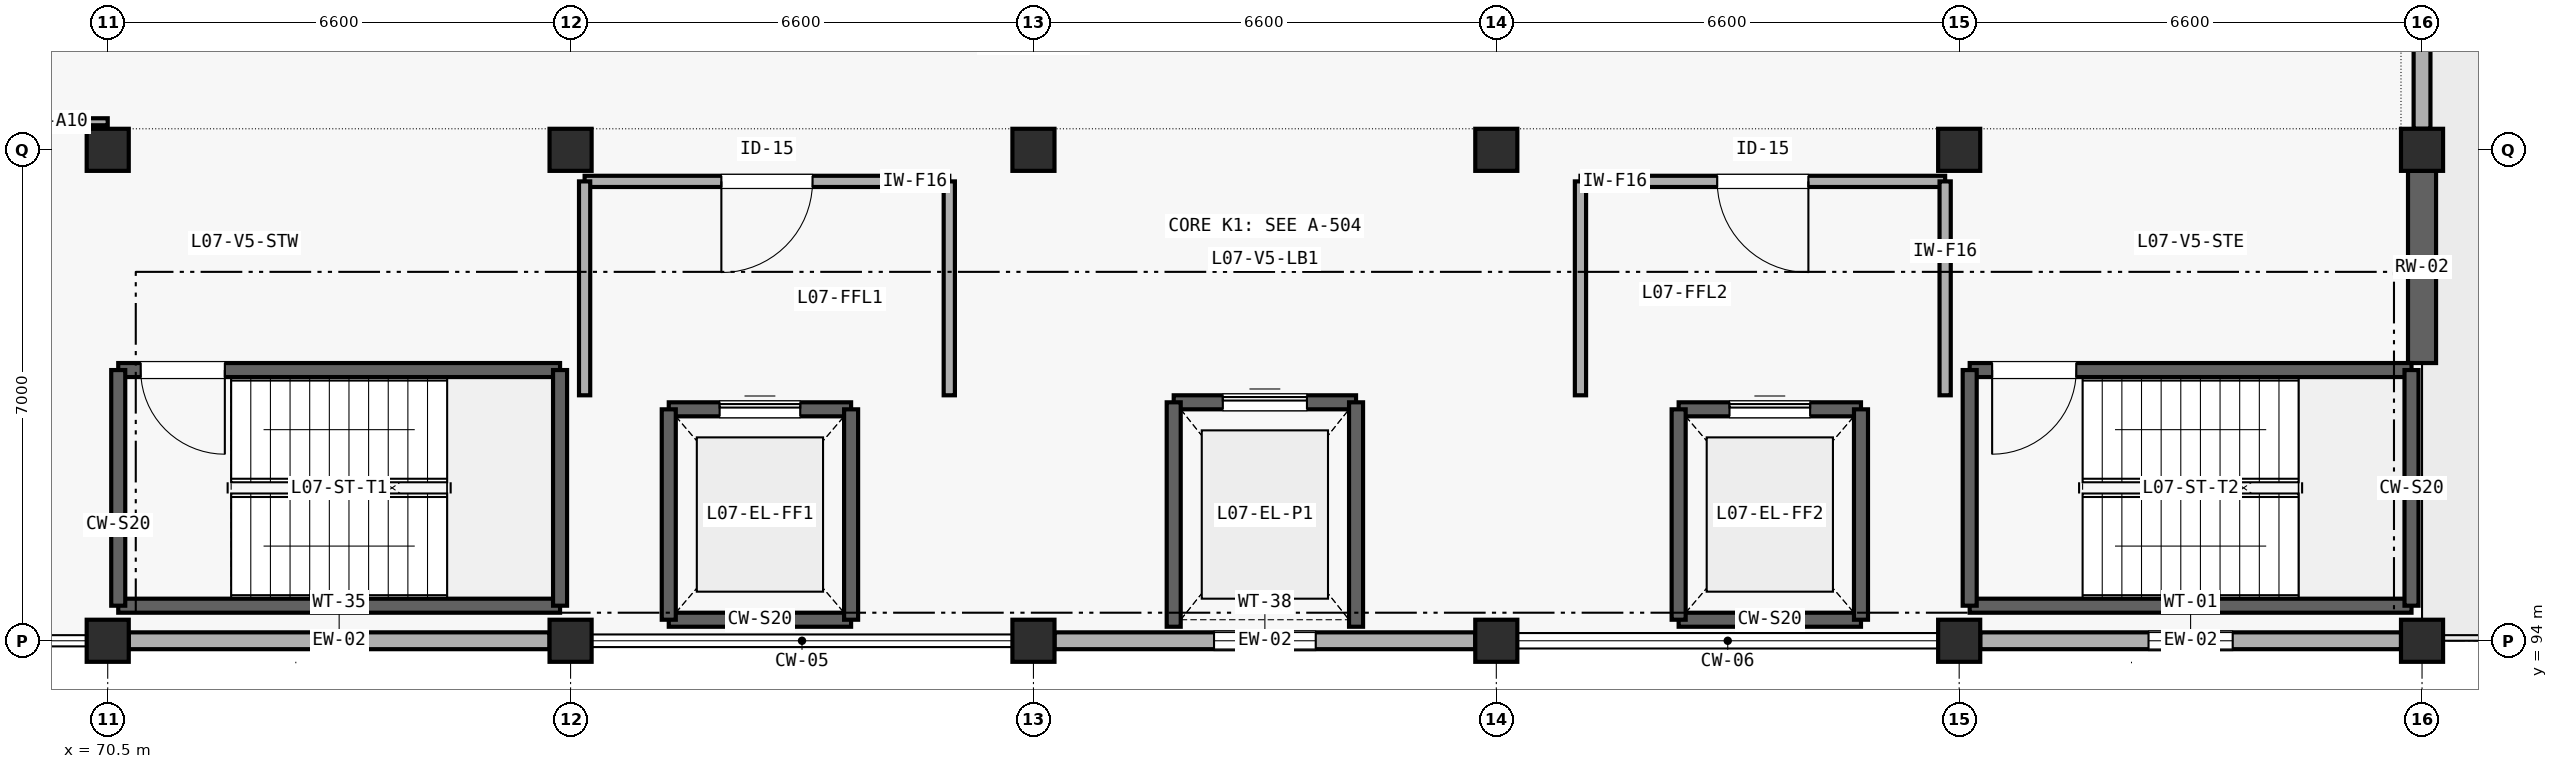
"""IFC4 building model, lengths in metres.
Left out: names, types, materials, properties, quantities, classifications, styles, units other than length and angle.
Written with IfcOpenShell. Run it as: python <this file> out.ifc"""

import sys

from ifc_helpers import new_model, si_unit, direction, frame, frame_2d, origin, origin_2d, place, context, subcontext, project, spatial, rectangle, extrude, element, fill, save


model = new_model("IFC4")
c1 = context("Model", 3, precision=1e-05, world=origin(), true_north=direction((0.0, 1.0)))
c2 = subcontext(c1, "Body", "Model", "MODEL_VIEW")
j1 = project(units=[si_unit("LENGTHUNIT", "METRE"), si_unit("PLANEANGLEUNIT", "RADIAN")], contexts=[c1])
p1 = place(None, origin())
s1 = spatial("IfcSite", under=j1, at=p1, CompositionType="ELEMENT")
p2 = place(p1, origin())
s2 = spatial("IfcBuilding", under=s1, at=p2, CompositionType="ELEMENT")
p3 = place(p2, frame((0.0, 0.0, 29.4)))
s3 = spatial("IfcBuildingStorey", under=s2, at=p3, CompositionType="ELEMENT", Elevation=29.4)
for number, where, z_axis, x_axis in (
    (1, (70.5, 94.0, 0.0), (0.0, 0.0, 1.0), (1.0, 0.0, 0.0)),
    (2, (70.5, 101.0, 0.0), (0.0, 0.0, 1.0), (1.0, 0.0, 0.0)),
    (3, (77.1, 94.0, 0.0), (0.0, 0.0, 1.0), (1.0, 0.0, 0.0)),
    (4, (77.1, 101.0, 0.0), (0.0, 0.0, 1.0), (1.0, 0.0, 0.0)),
    (5, (83.7, 94.0, 0.0), (0.0, 0.0, 1.0), (1.0, 0.0, 0.0)),
    (6, (83.7, 101.0, 0.0), (0.0, 0.0, 1.0), (1.0, 0.0, 0.0)),
    (7, (90.3, 94.0, 0.0), (0.0, 0.0, 1.0), (1.0, 0.0, 0.0)),
    (8, (90.3, 101.0, 0.0), (0.0, 0.0, 1.0), (1.0, 0.0, 0.0)),
    (9, (96.9, 94.0, 0.0), (0.0, 0.0, 1.0), (1.0, 0.0, 0.0)),
    (10, (96.9, 101.0, 0.0), (0.0, 0.0, 1.0), (1.0, 0.0, 0.0)),
    (11, (103.5, 94.0, 0.0), (0.0, 0.0, 1.0), (1.0, 0.0, 0.0)),
    (12, (103.5, 101.0, 0.0), (0.0, 0.0, 1.0), (1.0, 0.0, 0.0)),
):
    element("IfcColumn", number, at=place(p3, frame(where, z_axis=z_axis, x_axis=x_axis)), inside=s3, PredefinedType="COLUMN", context=c2, shape_type="SweptSolid", body=[
        extrude(rectangle(XDim=0.6, YDim=0.6, at=origin_2d()), origin(), (0.0, 0.0, 1.0), 4.2),
    ])
p4 = place(p3, frame((70.8, 94.0, 0.0), z_axis=(0.0, 0.0, 1.0), x_axis=(1.0, 0.0, 0.0)))
e13 = element("IfcWall", 13, at=p4, inside=s3, PredefinedType="SOLIDWALL", context=c2, shape_type="SweptSolid", body=[
    extrude(rectangle(XDim=6.0, YDim=0.24, at=frame_2d((3.0, 0.0))), origin(), (0.0, 0.0, 1.0), 3.135),
])
p5 = place(p4, frame((2.625, 0.0, 0.85)))
e14 = element("IfcOpeningElement", 14, at=p5, cuts=e13, PredefinedType="OPENING", context=c2, shape_type="SweptSolid", body=[
    extrude(rectangle(XDim=0.75, YDim=1.55, at=frame_2d((0.375, 0.775))), frame((0.0, 0.13, 0.0), z_axis=(0.0, -1.0, 0.0), x_axis=(1.0, 0.0, 0.0)), (0.0, 0.0, 1.0), 0.26),
])
p6 = place(p3, frame((84.0, 94.0, 0.0), z_axis=(0.0, 0.0, 1.0), x_axis=(1.0, 0.0, 0.0)))
e15 = element("IfcWall", 15, at=p6, inside=s3, PredefinedType="SOLIDWALL", context=c2, shape_type="SweptSolid", body=[
    extrude(rectangle(XDim=6.0, YDim=0.24, at=frame_2d((3.0, 0.0))), origin(), (0.0, 0.0, 1.0), 3.285),
])
p7 = place(p6, frame((2.275, 0.0, 0.85)))
e16 = element("IfcOpeningElement", 16, at=p7, cuts=e15, PredefinedType="OPENING", context=c2, shape_type="SweptSolid", body=[
    extrude(rectangle(XDim=1.45, YDim=1.55, at=frame_2d((0.725, 0.775))), frame((0.0, 0.13, 0.0), z_axis=(0.0, -1.0, 0.0), x_axis=(1.0, 0.0, 0.0)), (0.0, 0.0, 1.0), 0.26),
])
p8 = place(p3, frame((97.2, 94.0, 0.0), z_axis=(0.0, 0.0, 1.0), x_axis=(1.0, 0.0, 0.0)))
e17 = element("IfcWall", 17, at=p8, inside=s3, PredefinedType="SOLIDWALL", context=c2, shape_type="SweptSolid", body=[
    extrude(rectangle(XDim=6.0, YDim=0.24, at=frame_2d((3.0, 0.0))), origin(), (0.0, 0.0, 1.0), 3.365),
])
p9 = place(p8, frame((2.4, 0.0, 0.85)))
e18 = element("IfcOpeningElement", 18, at=p9, cuts=e17, PredefinedType="OPENING", context=c2, shape_type="SweptSolid", body=[
    extrude(rectangle(XDim=1.2, YDim=1.35, at=frame_2d((0.6, 0.675))), frame((0.0, 0.13, 0.0), z_axis=(0.0, -1.0, 0.0), x_axis=(1.0, 0.0, 0.0)), (0.0, 0.0, 1.0), 0.26),
])
p10 = place(p3, frame((103.5, 97.96, 0.0), z_axis=(0.0, 0.0, 1.0), x_axis=(0.0, 1.0, 0.0)))
e19 = element("IfcWall", 19, at=p10, inside=s3, PredefinedType="SHEAR", context=c2, shape_type="SweptSolid", body=[
    extrude(rectangle(XDim=2.74, YDim=0.4, at=frame_2d((1.37, 0.0))), origin(), (0.0, 0.0, 1.0), 3.85),
])
p11 = place(p3, frame((103.5, 101.3, 0.0), z_axis=(0.0, 0.0, 1.0), x_axis=(0.0, 1.0, 0.0)))
e20 = element("IfcWall", 20, at=p11, inside=s3, PredefinedType="SOLIDWALL", context=c2, shape_type="SweptSolid", body=[
    extrude(rectangle(XDim=6.4, YDim=0.24, at=frame_2d((3.2, 0.0))), origin(), (0.0, 0.0, 1.0), 3.505),
])
p12 = place(p11, frame((2.4, 0.0, 0.0)))
e21 = element("IfcOpeningElement", 21, at=p12, cuts=e20, PredefinedType="OPENING", context=c2, shape_type="SweptSolid", body=[
    extrude(rectangle(XDim=1.6, YDim=2.15, at=frame_2d((0.8, 1.075))), frame((0.0, 0.13, 0.0), z_axis=(0.0, -1.0, 0.0), x_axis=(1.0, 0.0, 0.0)), (0.0, 0.0, 1.0), 0.26),
])
p13 = place(p3, frame((70.65, 94.5, 0.0), z_axis=(0.0, 0.0, 1.0), x_axis=(1.0, 0.0, 0.0)))
e22 = element("IfcWall", 22, at=p13, inside=s3, PredefinedType="SHEAR", context=c2, shape_type="SweptSolid", body=[
    extrude(rectangle(XDim=6.3, YDim=0.2, at=frame_2d((3.15, 0.0))), origin(), (0.0, 0.0, 1.0), 4.2),
])
p14 = place(p3, frame((70.65, 97.86, 0.0), z_axis=(0.0, 0.0, 1.0), x_axis=(1.0, 0.0, 0.0)))
e23 = element("IfcWall", 23, at=p14, inside=s3, PredefinedType="SHEAR", context=c2, shape_type="SweptSolid", body=[
    extrude(rectangle(XDim=6.3, YDim=0.2, at=frame_2d((3.15, 0.0))), origin(), (0.0, 0.0, 1.0), 4.2),
])
p15 = place(p14, frame((0.32, 0.0, 0.0)))
e24 = element("IfcOpeningElement", 24, at=p15, cuts=e23, PredefinedType="OPENING", context=c2, shape_type="SweptSolid", body=[
    extrude(rectangle(XDim=1.2, YDim=2.15, at=frame_2d((0.6, 1.075))), frame((0.0, 0.11, 0.0), z_axis=(0.0, -1.0, 0.0), x_axis=(1.0, 0.0, 0.0)), (0.0, 0.0, 1.0), 0.22),
])
for number, where, z_axis, x_axis in (
    (25, (70.65, 94.5, 0.0), (0.0, 0.0, 1.0), (0.0, 1.0, 0.0)),
    (26, (76.95, 94.5, 0.0), (0.0, 0.0, 1.0), (0.0, 1.0, 0.0)),
):
    element("IfcWall", number, at=place(p3, frame(where, z_axis=z_axis, x_axis=x_axis)), inside=s3, PredefinedType="SHEAR", context=c2, shape_type="SweptSolid", body=[
        extrude(rectangle(XDim=3.36, YDim=0.2, at=frame_2d((1.68, 0.0))), origin(), (0.0, 0.0, 1.0), 4.2),
    ])
p16 = place(p3, frame((97.05, 94.5, 0.0), z_axis=(0.0, 0.0, 1.0), x_axis=(1.0, 0.0, 0.0)))
e27 = element("IfcWall", 27, at=p16, inside=s3, PredefinedType="SHEAR", context=c2, shape_type="SweptSolid", body=[
    extrude(rectangle(XDim=6.3, YDim=0.2, at=frame_2d((3.15, 0.0))), origin(), (0.0, 0.0, 1.0), 4.2),
])
p17 = place(p3, frame((97.05, 97.86, 0.0), z_axis=(0.0, 0.0, 1.0), x_axis=(1.0, 0.0, 0.0)))
e28 = element("IfcWall", 28, at=p17, inside=s3, PredefinedType="SHEAR", context=c2, shape_type="SweptSolid", body=[
    extrude(rectangle(XDim=6.3, YDim=0.2, at=frame_2d((3.15, 0.0))), origin(), (0.0, 0.0, 1.0), 4.2),
])
p18 = place(p17, frame((0.32, 0.0, 0.0)))
e29 = element("IfcOpeningElement", 29, at=p18, cuts=e28, PredefinedType="OPENING", context=c2, shape_type="SweptSolid", body=[
    extrude(rectangle(XDim=1.2, YDim=2.15, at=frame_2d((0.6, 1.075))), frame((0.0, 0.11, 0.0), z_axis=(0.0, -1.0, 0.0), x_axis=(1.0, 0.0, 0.0)), (0.0, 0.0, 1.0), 0.22),
])
for number, where, z_axis, x_axis in (
    (30, (97.05, 94.5, 0.0), (0.0, 0.0, 1.0), (0.0, 1.0, 0.0)),
    (31, (103.35, 94.5, 0.0), (0.0, 0.0, 1.0), (0.0, 1.0, 0.0)),
):
    element("IfcWall", number, at=place(p3, frame(where, z_axis=z_axis, x_axis=x_axis)), inside=s3, PredefinedType="SHEAR", context=c2, shape_type="SweptSolid", body=[
        extrude(rectangle(XDim=3.36, YDim=0.2, at=frame_2d((1.68, 0.0))), origin(), (0.0, 0.0, 1.0), 4.2),
    ])
p19 = place(p3, frame((78.5, 94.3, 0.0), z_axis=(0.0, 0.0, 1.0), x_axis=(1.0, 0.0, 0.0)))
e32 = element("IfcWall", 32, at=p19, inside=s3, PredefinedType="SHEAR", context=c2, shape_type="SweptSolid", body=[
    extrude(rectangle(XDim=2.6, YDim=0.2, at=frame_2d((1.3, 0.0))), origin(), (0.0, 0.0, 1.0), 4.2),
])
p20 = place(p3, frame((78.5, 97.3, 0.0), z_axis=(0.0, 0.0, 1.0), x_axis=(1.0, 0.0, 0.0)))
e33 = element("IfcWall", 33, at=p20, inside=s3, PredefinedType="SHEAR", context=c2, shape_type="SweptSolid", body=[
    extrude(rectangle(XDim=2.6, YDim=0.2, at=frame_2d((1.3, 0.0))), origin(), (0.0, 0.0, 1.0), 4.2),
])
p21 = place(p20, frame((0.725, 0.0, 0.0)))
e34 = element("IfcOpeningElement", 34, at=p21, cuts=e33, PredefinedType="OPENING", context=c2, shape_type="SweptSolid", body=[
    extrude(rectangle(XDim=1.15, YDim=2.2, at=frame_2d((0.575, 1.1))), frame((0.0, 0.11, 0.0), z_axis=(0.0, -1.0, 0.0), x_axis=(1.0, 0.0, 0.0)), (0.0, 0.0, 1.0), 0.22),
])
for number, where, z_axis, x_axis in (
    (35, (78.5, 94.3, 0.0), (0.0, 0.0, 1.0), (0.0, 1.0, 0.0)),
    (36, (81.1, 94.3, 0.0), (0.0, 0.0, 1.0), (0.0, 1.0, 0.0)),
):
    element("IfcWall", number, at=place(p3, frame(where, z_axis=z_axis, x_axis=x_axis)), inside=s3, PredefinedType="SHEAR", context=c2, shape_type="SweptSolid", body=[
        extrude(rectangle(XDim=3.0, YDim=0.2, at=frame_2d((1.5, 0.0))), origin(), (0.0, 0.0, 1.0), 4.2),
    ])
p22 = place(p3, frame((92.9, 94.3, 0.0), z_axis=(0.0, 0.0, 1.0), x_axis=(1.0, 0.0, 0.0)))
e37 = element("IfcWall", 37, at=p22, inside=s3, PredefinedType="SHEAR", context=c2, shape_type="SweptSolid", body=[
    extrude(rectangle(XDim=2.6, YDim=0.2, at=frame_2d((1.3, 0.0))), origin(), (0.0, 0.0, 1.0), 4.2),
])
p23 = place(p3, frame((92.9, 97.3, 0.0), z_axis=(0.0, 0.0, 1.0), x_axis=(1.0, 0.0, 0.0)))
e38 = element("IfcWall", 38, at=p23, inside=s3, PredefinedType="SHEAR", context=c2, shape_type="SweptSolid", body=[
    extrude(rectangle(XDim=2.6, YDim=0.2, at=frame_2d((1.3, 0.0))), origin(), (0.0, 0.0, 1.0), 4.2),
])
p24 = place(p23, frame((0.725, 0.0, 0.0)))
e39 = element("IfcOpeningElement", 39, at=p24, cuts=e38, PredefinedType="OPENING", context=c2, shape_type="SweptSolid", body=[
    extrude(rectangle(XDim=1.15, YDim=2.2, at=frame_2d((0.575, 1.1))), frame((0.0, 0.11, 0.0), z_axis=(0.0, -1.0, 0.0), x_axis=(1.0, 0.0, 0.0)), (0.0, 0.0, 1.0), 0.22),
])
for number, where, z_axis, x_axis in (
    (40, (92.9, 94.3, 0.0), (0.0, 0.0, 1.0), (0.0, 1.0, 0.0)),
    (41, (95.5, 94.3, 0.0), (0.0, 0.0, 1.0), (0.0, 1.0, 0.0)),
):
    element("IfcWall", number, at=place(p3, frame(where, z_axis=z_axis, x_axis=x_axis)), inside=s3, PredefinedType="SHEAR", context=c2, shape_type="SweptSolid", body=[
        extrude(rectangle(XDim=3.0, YDim=0.2, at=frame_2d((1.5, 0.0))), origin(), (0.0, 0.0, 1.0), 4.2),
    ])
p25 = place(p3, frame((85.7, 97.4, 0.0), z_axis=(0.0, 0.0, 1.0), x_axis=(1.0, 0.0, 0.0)))
e42 = element("IfcWall", 42, at=p25, inside=s3, PredefinedType="SHEAR", context=c2, shape_type="SweptSolid", body=[
    extrude(rectangle(XDim=2.6, YDim=0.2, at=frame_2d((1.3, 0.0))), origin(), (0.0, 0.0, 1.0), 4.2),
])
p26 = place(p25, frame((0.7, 0.0, 0.0)))
e43 = element("IfcOpeningElement", 43, at=p26, cuts=e42, PredefinedType="OPENING", context=c2, shape_type="SweptSolid", body=[
    extrude(rectangle(XDim=1.2, YDim=2.2, at=frame_2d((0.6, 1.1))), frame((0.0, 0.11, 0.0), z_axis=(0.0, -1.0, 0.0), x_axis=(1.0, 0.0, 0.0)), (0.0, 0.0, 1.0), 0.22),
])
for number, where, z_axis, x_axis in (
    (44, (85.7, 94.2, 0.0), (0.0, 0.0, 1.0), (0.0, 1.0, 0.0)),
    (45, (88.3, 94.2, 0.0), (0.0, 0.0, 1.0), (0.0, 1.0, 0.0)),
):
    element("IfcWall", number, at=place(p3, frame(where, z_axis=z_axis, x_axis=x_axis)), inside=s3, PredefinedType="SHEAR", context=c2, shape_type="SweptSolid", body=[
        extrude(rectangle(XDim=3.2, YDim=0.2, at=frame_2d((1.6, 0.0))), origin(), (0.0, 0.0, 1.0), 4.2),
    ])
p27 = place(p3, frame((77.3, 100.55, 0.0), z_axis=(0.0, 0.0, 1.0), x_axis=(1.0, 0.0, 0.0)))
e46 = element("IfcWall", 46, at=p27, inside=s3, PredefinedType="SOLIDWALL", context=c2, shape_type="SweptSolid", body=[
    extrude(rectangle(XDim=5.2, YDim=0.16, at=frame_2d((2.6, 0.0))), origin(), (0.0, 0.0, 1.0), 3.9),
])
p28 = place(p27, frame((1.95, 0.0, 0.0)))
e47 = element("IfcOpeningElement", 47, at=p28, cuts=e46, PredefinedType="OPENING", context=c2, shape_type="SweptSolid", body=[
    extrude(rectangle(XDim=1.3, YDim=2.15, at=frame_2d((0.65, 1.075))), frame((0.0, 0.09, 0.0), z_axis=(0.0, -1.0, 0.0), x_axis=(1.0, 0.0, 0.0)), (0.0, 0.0, 1.0), 0.18),
])
p29 = place(p3, frame((77.3, 97.5, 0.0), z_axis=(0.0, 0.0, 1.0), x_axis=(0.0, 1.0, 0.0)))
e48 = element("IfcWall", 48, at=p29, inside=s3, PredefinedType="SOLIDWALL", context=c2, shape_type="SweptSolid", body=[
    extrude(rectangle(XDim=3.05, YDim=0.16, at=frame_2d((1.525, 0.0))), origin(), (0.0, 0.0, 1.0), 3.405),
])
p30 = place(p3, frame((82.5, 97.5, 0.0), z_axis=(0.0, 0.0, 1.0), x_axis=(0.0, 1.0, 0.0)))
e49 = element("IfcWall", 49, at=p30, inside=s3, PredefinedType="SOLIDWALL", context=c2, shape_type="SweptSolid", body=[
    extrude(rectangle(XDim=3.05, YDim=0.16, at=frame_2d((1.525, 0.0))), origin(), (0.0, 0.0, 1.0), 3.9),
])
p31 = place(p3, frame((91.5, 100.55, 0.0), z_axis=(0.0, 0.0, 1.0), x_axis=(1.0, 0.0, 0.0)))
e50 = element("IfcWall", 50, at=p31, inside=s3, PredefinedType="SOLIDWALL", context=c2, shape_type="SweptSolid", body=[
    extrude(rectangle(XDim=5.2, YDim=0.16, at=frame_2d((2.6, 0.0))), origin(), (0.0, 0.0, 1.0), 3.9),
])
p32 = place(p31, frame((1.95, 0.0, 0.0)))
e51 = element("IfcOpeningElement", 51, at=p32, cuts=e50, PredefinedType="OPENING", context=c2, shape_type="SweptSolid", body=[
    extrude(rectangle(XDim=1.3, YDim=2.15, at=frame_2d((0.65, 1.075))), frame((0.0, 0.09, 0.0), z_axis=(0.0, -1.0, 0.0), x_axis=(1.0, 0.0, 0.0)), (0.0, 0.0, 1.0), 0.18),
])
p33 = place(p3, frame((91.5, 97.5, 0.0), z_axis=(0.0, 0.0, 1.0), x_axis=(0.0, 1.0, 0.0)))
e52 = element("IfcWall", 52, at=p33, inside=s3, PredefinedType="SOLIDWALL", context=c2, shape_type="SweptSolid", body=[
    extrude(rectangle(XDim=3.05, YDim=0.16, at=frame_2d((1.525, 0.0))), origin(), (0.0, 0.0, 1.0), 3.9),
])
p34 = place(p3, frame((96.7, 97.5, 0.0), z_axis=(0.0, 0.0, 1.0), x_axis=(0.0, 1.0, 0.0)))
e53 = element("IfcWall", 53, at=p34, inside=s3, PredefinedType="SOLIDWALL", context=c2, shape_type="SweptSolid", body=[
    extrude(rectangle(XDim=3.05, YDim=0.16, at=frame_2d((1.525, 0.0))), origin(), (0.0, 0.0, 1.0), 3.405),
])
p35 = place(p3, frame((64.1, 101.4, 0.0), z_axis=(0.0, 0.0, 1.0), x_axis=(1.0, 0.0, 0.0)))
e54 = element("IfcWall", 54, at=p35, inside=s3, PredefinedType="PARTITIONING", context=c2, shape_type="SweptSolid", body=[
    extrude(rectangle(XDim=6.4, YDim=0.1, at=frame_2d((3.2, 0.0))), origin(), (0.0, 0.0, 1.0), 3.135),
])
p36 = place(p35, frame((2.45, 0.0, 0.0)))
e55 = element("IfcOpeningElement", 55, at=p36, cuts=e54, PredefinedType="OPENING", context=c2, shape_type="SweptSolid", body=[
    extrude(rectangle(XDim=1.5, YDim=2.15, at=frame_2d((0.75, 1.075))), frame((0.0, 0.06, 0.0), z_axis=(0.0, -1.0, 0.0), x_axis=(1.0, 0.0, 0.0)), (0.0, 0.0, 1.0), 0.12),
])
p37 = place(p5, origin())
e56 = element("IfcWindow", 56, at=p37, inside=s3, PartitioningType="SINGLE_PANEL", PredefinedType="WINDOW", context=c2, shape_type="SweptSolid", body=[
    extrude(rectangle(XDim=0.75, YDim=1.55, at=frame_2d((0.375, 0.775))), frame((0.0, 0.03, 0.0), z_axis=(0.0, -1.0, 0.0), x_axis=(1.0, 0.0, 0.0)), (0.0, 0.0, 1.0), 0.06),
])
fill(e14, e56)
p38 = place(p7, origin())
e57 = element("IfcWindow", 57, at=p38, inside=s3, PartitioningType="SINGLE_PANEL", PredefinedType="WINDOW", context=c2, shape_type="SweptSolid", body=[
    extrude(rectangle(XDim=1.45, YDim=1.55, at=frame_2d((0.725, 0.775))), frame((0.0, 0.03, 0.0), z_axis=(0.0, -1.0, 0.0), x_axis=(1.0, 0.0, 0.0)), (0.0, 0.0, 1.0), 0.06),
])
fill(e16, e57)
p39 = place(p9, origin())
e58 = element("IfcWindow", 58, at=p39, inside=s3, PartitioningType="SINGLE_PANEL", PredefinedType="WINDOW", context=c2, shape_type="SweptSolid", body=[
    extrude(rectangle(XDim=1.2, YDim=1.35, at=frame_2d((0.6, 0.675))), frame((0.0, 0.03, 0.0), z_axis=(0.0, -1.0, 0.0), x_axis=(1.0, 0.0, 0.0)), (0.0, 0.0, 1.0), 0.06),
])
fill(e18, e58)
p40 = place(p15, frame((1.2, 0.0, 0.0), z_axis=(0.0, 0.0, 1.0), x_axis=(-1.0, 0.0, 0.0)))
e59 = element("IfcDoor", 59, at=p40, inside=s3, OperationType="SINGLE_SWING_LEFT", PredefinedType="DOOR", context=c2, shape_type="SweptSolid", body=[
    extrude(rectangle(XDim=1.2, YDim=2.15, at=frame_2d((0.6, 1.075))), frame((0.0, 0.025, 0.0), z_axis=(0.0, -1.0, 0.0), x_axis=(1.0, 0.0, 0.0)), (0.0, 0.0, 1.0), 0.05),
])
fill(e24, e59)
p41 = place(p18, frame((1.2, 0.0, 0.0), z_axis=(0.0, 0.0, 1.0), x_axis=(-1.0, 0.0, 0.0)))
e60 = element("IfcDoor", 60, at=p41, inside=s3, OperationType="SINGLE_SWING_RIGHT", PredefinedType="DOOR", context=c2, shape_type="SweptSolid", body=[
    extrude(rectangle(XDim=1.2, YDim=2.15, at=frame_2d((0.6, 1.075))), frame((0.0, 0.025, 0.0), z_axis=(0.0, -1.0, 0.0), x_axis=(1.0, 0.0, 0.0)), (0.0, 0.0, 1.0), 0.05),
])
fill(e29, e60)
p42 = place(p21, origin())
e61 = element("IfcDoor", 61, at=p42, inside=s3, OperationType="SLIDING_TO_LEFT", PredefinedType="DOOR", context=c2, shape_type="SweptSolid", body=[
    extrude(rectangle(XDim=1.15, YDim=2.2, at=frame_2d((0.575, 1.1))), frame((0.0, 0.025, 0.0), z_axis=(0.0, -1.0, 0.0), x_axis=(1.0, 0.0, 0.0)), (0.0, 0.0, 1.0), 0.05),
])
fill(e34, e61)
p43 = place(p24, origin())
e62 = element("IfcDoor", 62, at=p43, inside=s3, OperationType="SLIDING_TO_LEFT", PredefinedType="DOOR", context=c2, shape_type="SweptSolid", body=[
    extrude(rectangle(XDim=1.15, YDim=2.2, at=frame_2d((0.575, 1.1))), frame((0.0, 0.025, 0.0), z_axis=(0.0, -1.0, 0.0), x_axis=(1.0, 0.0, 0.0)), (0.0, 0.0, 1.0), 0.05),
])
fill(e39, e62)
p44 = place(p26, origin())
e63 = element("IfcDoor", 63, at=p44, inside=s3, OperationType="SLIDING_TO_LEFT", PredefinedType="DOOR", context=c2, shape_type="SweptSolid", body=[
    extrude(rectangle(XDim=1.2, YDim=2.2, at=frame_2d((0.6, 1.1))), frame((0.0, 0.025, 0.0), z_axis=(0.0, -1.0, 0.0), x_axis=(1.0, 0.0, 0.0)), (0.0, 0.0, 1.0), 0.05),
])
fill(e43, e63)
p45 = place(p28, frame((1.3, 0.0, 0.0), z_axis=(0.0, 0.0, 1.0), x_axis=(-1.0, 0.0, 0.0)))
e64 = element("IfcDoor", 64, at=p45, inside=s3, OperationType="SINGLE_SWING_RIGHT", PredefinedType="DOOR", context=c2, shape_type="SweptSolid", body=[
    extrude(rectangle(XDim=1.3, YDim=2.15, at=frame_2d((0.65, 1.075))), frame((0.0, 0.025, 0.0), z_axis=(0.0, -1.0, 0.0), x_axis=(1.0, 0.0, 0.0)), (0.0, 0.0, 1.0), 0.05),
])
fill(e47, e64)
p46 = place(p32, frame((1.3, 0.0, 0.0), z_axis=(0.0, 0.0, 1.0), x_axis=(-1.0, 0.0, 0.0)))
e65 = element("IfcDoor", 65, at=p46, inside=s3, OperationType="SINGLE_SWING_LEFT", PredefinedType="DOOR", context=c2, shape_type="SweptSolid", body=[
    extrude(rectangle(XDim=1.3, YDim=2.15, at=frame_2d((0.65, 1.075))), frame((0.0, 0.025, 0.0), z_axis=(0.0, -1.0, 0.0), x_axis=(1.0, 0.0, 0.0)), (0.0, 0.0, 1.0), 0.05),
])
fill(e51, e65)
save(model, sys.argv[1])
